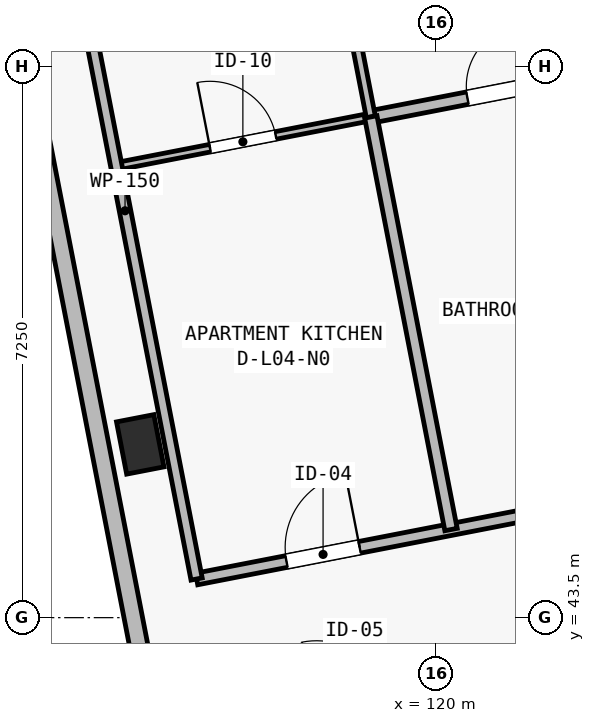
"""IFC4 building model, lengths in metres.
Left out: names, types, materials, properties, quantities, classifications, styles, units other than length and angle.
Written with IfcOpenShell. Run it as: python <this file> out.ifc"""

import sys

from ifc_helpers import new_model, si_unit, direction, frame, frame_2d, origin, origin_2d, place, context, subcontext, project, spatial, rectangle, extrude, element, fill, save


model = new_model("IFC4")
c1 = context("Model", 3, precision=1e-05, world=origin(), true_north=direction((0.0, 1.0)))
c2 = subcontext(c1, "Body", "Model", "MODEL_VIEW")
j1 = project(units=[si_unit("LENGTHUNIT", "METRE"), si_unit("PLANEANGLEUNIT", "RADIAN")], contexts=[c1])
p1 = place(None, origin())
s1 = spatial("IfcSite", under=j1, at=p1, CompositionType="ELEMENT")
p2 = place(p1, origin())
s2 = spatial("IfcBuilding", under=s1, at=p2, CompositionType="ELEMENT")
p3 = place(p2, frame((0.0, 0.0, 14.9)))
s3 = spatial("IfcBuildingStorey", under=s2, at=p3, CompositionType="ELEMENT", Elevation=14.9)
p4 = place(p3, frame((116.11, 45.78, 0.0), z_axis=(0.0, 0.0, 1.0), x_axis=(0.981627183448, 0.190808995377, 0.0)))
e1 = element("IfcColumn", 1, at=p4, inside=s3, PredefinedType="COLUMN", context=c2, shape_type="SweptSolid", body=[
    extrude(rectangle(XDim=0.5, YDim=0.7, at=origin_2d()), origin(), (0.0, 0.0, 1.0), 3.25),
])
p5 = place(p3, frame((117.985, 33.385, 0.0), z_axis=(0.0, 0.0, 1.0), x_axis=(-0.190808900739, 0.981627201843, 0.0)))
e2 = element("IfcWall", 2, at=p5, inside=s3, PredefinedType="SOLIDWALL", context=c2, shape_type="SweptSolid", body=[
    extrude(rectangle(XDim=20.65, YDim=0.24, at=frame_2d((10.325, 0.0))), origin(), (0.0, 0.0, 1.0), 3.0),
])
p6 = place(p5, frame((2.45, 0.0, 0.45)))
e3 = element("IfcOpeningElement", 3, at=p6, cuts=e2, PredefinedType="OPENING", context=c2, shape_type="SweptSolid", body=[
    extrude(rectangle(XDim=0.74, YDim=2.26, at=frame_2d((0.37, 1.13))), frame((0.0, 0.135, 0.0), z_axis=(0.0, -1.0, 0.0), x_axis=(1.0, 0.0, 0.0)), (0.0, 0.0, 1.0), 0.27),
])
p7 = place(p5, frame((17.62, 0.0, 0.52)))
e4 = element("IfcOpeningElement", 4, at=p7, cuts=e2, PredefinedType="OPENING", context=c2, shape_type="SweptSolid", body=[
    extrude(rectangle(XDim=0.58, YDim=2.16, at=frame_2d((0.29, 1.08))), frame((0.0, 0.135, 0.0), z_axis=(0.0, -1.0, 0.0), x_axis=(1.0, 0.0, 0.0)), (0.0, 0.0, 1.0), 0.27),
])
p8 = place(p3, frame((116.482, 41.797, 0.0), z_axis=(0.0, 0.0, 1.0), x_axis=(0.981629678105, 0.190796161028, 0.0)))
e5 = element("IfcWall", 5, at=p8, inside=s3, PredefinedType="PARTITIONING", context=c2, shape_type="SweptSolid", body=[
    extrude(rectangle(XDim=7.735, YDim=0.155, at=frame_2d((3.868, 0.0))), origin(), (0.0, 0.0, 1.0), 2.97),
])
p9 = place(p8, frame((1.985, 0.0, 0.0)))
e6 = element("IfcOpeningElement", 6, at=p9, cuts=e5, PredefinedType="OPENING", context=c2, shape_type="SweptSolid", body=[
    extrude(rectangle(XDim=1.02, YDim=2.2, at=frame_2d((0.51, 1.1))), frame((0.0, 0.093, 0.0), z_axis=(0.0, -1.0, 0.0), x_axis=(1.0, 0.0, 0.0)), (0.0, 0.0, 1.0), 0.185),
])
p10 = place(p3, frame((116.852, 44.009, 0.0), z_axis=(0.0, 0.0, 1.0), x_axis=(0.981629173664, 0.190798756314, 0.0)))
e7 = element("IfcWall", 7, at=p10, inside=s3, PredefinedType="PARTITIONING", context=c2, shape_type="SweptSolid", body=[
    extrude(rectangle(XDim=6.82, YDim=0.155, at=frame_2d((3.41, 0.0))), origin(), (0.0, 0.0, 1.0), 2.97),
])
p11 = place(p10, frame((1.205, 0.0, 0.0)))
e8 = element("IfcOpeningElement", 8, at=p11, cuts=e7, PredefinedType="OPENING", context=c2, shape_type="SweptSolid", body=[
    extrude(rectangle(XDim=0.98, YDim=2.15, at=frame_2d((0.49, 1.075))), frame((0.0, 0.093, 0.0), z_axis=(0.0, -1.0, 0.0), x_axis=(1.0, 0.0, 0.0)), (0.0, 0.0, 1.0), 0.185),
])
p12 = place(p3, frame((115.797, 49.437, 0.0), z_axis=(0.0, 0.0, 1.0), x_axis=(0.981615762271, 0.19086774285, 0.0)))
e9 = element("IfcWall", 9, at=p12, inside=s3, PredefinedType="PARTITIONING", context=c2, shape_type="SweptSolid", body=[
    extrude(rectangle(XDim=3.41, YDim=0.1, at=frame_2d((1.705, 0.0))), origin(), (0.0, 0.0, 1.0), 2.97),
])
p13 = place(p12, frame((1.255, 0.0, 0.0)))
e10 = element("IfcOpeningElement", 10, at=p13, cuts=e9, PredefinedType="OPENING", context=c2, shape_type="SweptSolid", body=[
    extrude(rectangle(XDim=0.88, YDim=2.1, at=frame_2d((0.44, 1.05))), frame((0.0, 0.065, 0.0), z_axis=(0.0, -1.0, 0.0), x_axis=(1.0, 0.0, 0.0)), (0.0, 0.0, 1.0), 0.13),
])
p14 = place(p3, frame((119.144, 50.088, 0.0), z_axis=(0.0, 0.0, 1.0), x_axis=(0.981629173664, 0.190798756314, 0.0)))
e11 = element("IfcWall", 11, at=p14, inside=s3, PredefinedType="PLUMBINGWALL", context=c2, shape_type="SweptSolid", body=[
    extrude(rectangle(XDim=3.41, YDim=0.165, at=frame_2d((1.705, 0.0))), origin(), (0.0, 0.0, 1.0), 2.97),
])
p15 = place(p14, frame((1.295, 0.0, 0.0)))
e12 = element("IfcOpeningElement", 12, at=p15, cuts=e11, PredefinedType="OPENING", context=c2, shape_type="SweptSolid", body=[
    extrude(rectangle(XDim=0.82, YDim=2.08, at=frame_2d((0.41, 1.04))), frame((0.0, 0.097, 0.0), z_axis=(0.0, -1.0, 0.0), x_axis=(1.0, 0.0, 0.0)), (0.0, 0.0, 1.0), 0.195),
])
p16 = place(p3, frame((119.144, 50.088, 0.0), z_axis=(0.0, 0.0, 1.0), x_axis=(-0.190812443151, 0.981626513262, 0.0)))
e13 = element("IfcWall", 13, at=p16, inside=s3, PredefinedType="PARTITIONING", context=c2, shape_type="SweptSolid", body=[
    extrude(rectangle(XDim=4.34, YDim=0.12, at=frame_2d((2.17, 0.0))), origin(), (0.0, 0.0, 1.0), 2.97),
])
p17 = place(p16, frame((1.15, 0.0, 0.0)))
e14 = element("IfcOpeningElement", 14, at=p17, cuts=e13, PredefinedType="OPENING", context=c2, shape_type="SweptSolid", body=[
    extrude(rectangle(XDim=0.9, YDim=2.1, at=frame_2d((0.45, 1.05))), frame((0.0, 0.075, 0.0), z_axis=(0.0, -1.0, 0.0), x_axis=(1.0, 0.0, 0.0)), (0.0, 0.0, 1.0), 0.15),
])
p18 = place(p3, frame((120.199, 44.659, 0.0), z_axis=(0.0, 0.0, 1.0), x_axis=(-0.190807031124, 0.981627565258, 0.0)))
e15 = element("IfcWall", 15, at=p18, inside=s3, PredefinedType="PLUMBINGWALL", context=c2, shape_type="SweptSolid", body=[
    extrude(rectangle(XDim=5.53, YDim=0.165, at=frame_2d((2.765, 0.0))), origin(), (0.0, 0.0, 1.0), 2.97),
])
p19 = place(p3, frame((116.852, 44.009, 0.0), z_axis=(0.0, 0.0, 1.0), x_axis=(-0.190814044018, 0.981626202078, 0.0)))
e16 = element("IfcWall", 16, at=p19, inside=s3, PredefinedType="PARTITIONING", context=c2, shape_type="SweptSolid", body=[
    extrude(rectangle(XDim=9.87, YDim=0.15, at=frame_2d((4.935, 0.0))), origin(), (0.0, 0.0, 1.0), 2.97),
])
p20 = place(p11, origin())
e17 = element("IfcDoor", 17, at=p20, inside=s3, OperationType="SINGLE_SWING_RIGHT", PredefinedType="DOOR", context=c2, shape_type="SweptSolid", body=[
    extrude(rectangle(XDim=0.98, YDim=2.15, at=frame_2d((0.49, 1.075))), frame((0.0, 0.025, 0.0), z_axis=(0.0, -1.0, 0.0), x_axis=(1.0, 0.0, 0.0)), (0.0, 0.0, 1.0), 0.05),
])
fill(e8, e17)
p21 = place(p13, origin())
e18 = element("IfcDoor", 18, at=p21, inside=s3, OperationType="SINGLE_SWING_LEFT", PredefinedType="DOOR", context=c2, shape_type="SweptSolid", body=[
    extrude(rectangle(XDim=0.88, YDim=2.1, at=frame_2d((0.44, 1.05))), frame((0.0, 0.025, 0.0), z_axis=(0.0, -1.0, 0.0), x_axis=(1.0, 0.0, 0.0)), (0.0, 0.0, 1.0), 0.05),
])
fill(e10, e18)
p22 = place(p15, origin())
e19 = element("IfcDoor", 19, at=p22, inside=s3, OperationType="SINGLE_SWING_RIGHT", PredefinedType="DOOR", context=c2, shape_type="SweptSolid", body=[
    extrude(rectangle(XDim=0.82, YDim=2.08, at=frame_2d((0.41, 1.04))), frame((0.0, 0.025, 0.0), z_axis=(0.0, -1.0, 0.0), x_axis=(1.0, 0.0, 0.0)), (0.0, 0.0, 1.0), 0.05),
])
fill(e12, e19)
save(model, sys.argv[1])
